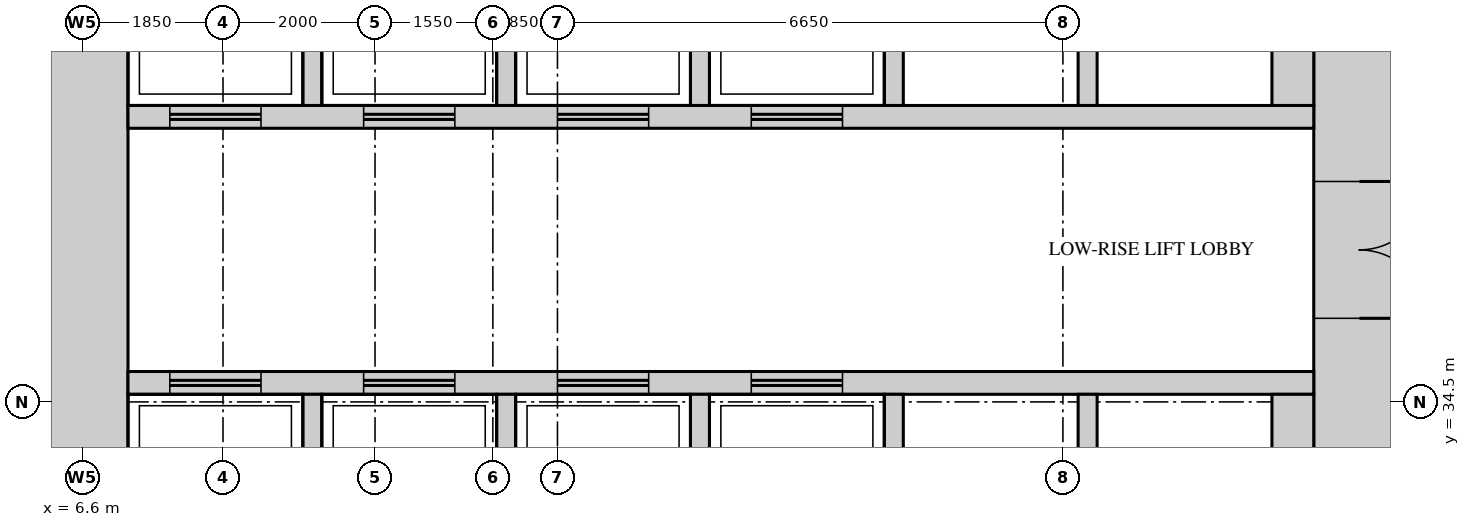
"""IFC4 building model, lengths in metres.
Left out: names, types, materials, properties, quantities, classifications, styles, units other than length and angle.
Written with IfcOpenShell. Run it as: python <this file> out.ifc"""

import sys

from ifc_helpers import new_model, si_unit, direction, frame, frame_2d, origin, place, context, subcontext, project, spatial, rectangle, extrude, source, transform, mapped, element, fill, save


model = new_model("IFC4")
c1 = context("Model", 3, precision=1e-05, world=origin(), true_north=direction((0.0, 1.0)))
c2 = subcontext(c1, "Body", "Model", "MODEL_VIEW")
j1 = project(units=[si_unit("LENGTHUNIT", "METRE"), si_unit("PLANEANGLEUNIT", "RADIAN")], contexts=[c1])
p1 = place(None, origin())
s1 = spatial("IfcSite", under=j1, at=p1, CompositionType="ELEMENT")
p2 = place(p1, origin())
s2 = spatial("IfcBuilding", under=s1, at=p2, CompositionType="ELEMENT")
p3 = place(p2, frame((0.0, 0.0, 82.5)))
s3 = spatial("IfcBuildingStorey", under=s2, at=p3, CompositionType="ELEMENT", Elevation=82.5)
m1 = source(origin(), c2, "Body", "SweptSolid", [
    extrude(rectangle(XDim=27.6, YDim=1.2, at=frame_2d((13.8, 0.0))), origin(), (0.0, 0.0, 1.0), 4.2),
])
p4 = place(p3, frame((23.4, 13.2, 0.0), z_axis=(0.0, 0.0, 1.0), x_axis=(0.0, 1.0, 0.0)))
e1 = element("IfcWall", 1, at=p4, inside=s3, PredefinedType="SHEAR", context=c2, shape_type="MappedRepresentation", body=[
    mapped(m1, transform((0.0, 0.0, 0.0))),
])
m2 = source(origin(), c2, "Body", "SweptSolid", [
    extrude(rectangle(XDim=1.8, YDim=2.1, at=frame_2d((0.9, 1.05))), frame((0.0, 0.61, 0.0), z_axis=(0.0, -1.0, 0.0), x_axis=(1.0, 0.0, 0.0)), (0.0, 0.0, 1.0), 1.22),
])
p5 = place(p4, frame((22.4, 0.0, 0.0)))
e2 = element("IfcOpeningElement", 2, at=p5, cuts=e1, PredefinedType="OPENING", context=c2, shape_type="MappedRepresentation", body=[
    mapped(m2, transform((0.0, 0.0, 0.0))),
])
m3 = source(origin(), c2, "Body", "SweptSolid", [
    extrude(rectangle(XDim=1.2, YDim=2.1, at=frame_2d((0.6, 1.05))), frame((0.0, 0.61, 0.0), z_axis=(0.0, -1.0, 0.0), x_axis=(1.0, 0.0, 0.0)), (0.0, 0.0, 1.0), 1.22),
])
p6 = place(p4, frame((14.4, 0.0, 0.0)))
e3 = element("IfcOpeningElement", 3, at=p6, cuts=e1, PredefinedType="OPENING", context=c2, shape_type="MappedRepresentation", body=[
    mapped(m3, transform((0.0, 0.0, 0.0))),
])
m4 = source(origin(), c2, "Body", "SweptSolid", [
    extrude(rectangle(XDim=0.9, YDim=2.1, at=frame_2d((0.45, 1.05))), frame((0.0, 0.61, 0.0), z_axis=(0.0, -1.0, 0.0), x_axis=(1.0, 0.0, 0.0)), (0.0, 0.0, 1.0), 1.22),
])
p7 = place(p4, frame((1.15, 0.0, 0.0)))
e4 = element("IfcOpeningElement", 4, at=p7, cuts=e1, PredefinedType="OPENING", context=c2, shape_type="MappedRepresentation", body=[
    mapped(m4, transform((0.0, 0.0, 0.0))),
])
p8 = place(p4, frame((6.0, 0.0, 0.0)))
e5 = element("IfcOpeningElement", 5, at=p8, cuts=e1, PredefinedType="OPENING", context=c2, shape_type="MappedRepresentation", body=[
    mapped(m4, transform((0.0, 0.0, 0.0))),
])
p9 = place(p3, frame((6.6, 13.2, 0.0), z_axis=(0.0, 0.0, 1.0), x_axis=(0.0, 1.0, 0.0)))
e6 = element("IfcWall", 6, at=p9, inside=s3, PredefinedType="SHEAR", context=c2, shape_type="MappedRepresentation", body=[
    mapped(m1, transform((0.0, 0.0, 0.0))),
])
m5 = source(origin(), c2, "Body", "SweptSolid", [
    extrude(rectangle(XDim=15.6, YDim=0.3, at=frame_2d((7.8, 0.0))), origin(), (0.0, 0.0, 1.0), 4.2),
])
p10 = place(p3, frame((7.2, 38.25, 0.0), z_axis=(0.0, 0.0, 1.0), x_axis=(1.0, 0.0, 0.0)))
e7 = element("IfcWall", 7, at=p10, inside=s3, PredefinedType="STANDARD", context=c2, shape_type="MappedRepresentation", body=[
    mapped(m5, transform((0.0, 0.0, 0.0))),
])
m6 = source(origin(), c2, "Body", "SweptSolid", [
    extrude(rectangle(XDim=1.2, YDim=2.1, at=frame_2d((0.6, 1.05))), frame((0.0, 0.16, 0.0), z_axis=(0.0, -1.0, 0.0), x_axis=(1.0, 0.0, 0.0)), (0.0, 0.0, 1.0), 0.32),
])
p11 = place(p10, frame((0.55, 0.0, 0.0)))
e8 = element("IfcOpeningElement", 8, at=p11, cuts=e7, PredefinedType="OPENING", context=c2, shape_type="MappedRepresentation", body=[
    mapped(m6, transform((0.0, 0.0, 0.0))),
])
p12 = place(p10, frame((3.1, 0.0, 0.0)))
e9 = element("IfcOpeningElement", 9, at=p12, cuts=e7, PredefinedType="OPENING", context=c2, shape_type="MappedRepresentation", body=[
    mapped(m6, transform((0.0, 0.0, 0.0))),
])
p13 = place(p10, frame((5.65, 0.0, 0.0)))
e10 = element("IfcOpeningElement", 10, at=p13, cuts=e7, PredefinedType="OPENING", context=c2, shape_type="MappedRepresentation", body=[
    mapped(m6, transform((0.0, 0.0, 0.0))),
])
p14 = place(p10, frame((8.2, 0.0, 0.0)))
e11 = element("IfcOpeningElement", 11, at=p14, cuts=e7, PredefinedType="OPENING", context=c2, shape_type="MappedRepresentation", body=[
    mapped(m6, transform((0.0, 0.0, 0.0))),
])
p15 = place(p3, frame((7.2, 34.75, 0.0), z_axis=(0.0, 0.0, 1.0), x_axis=(1.0, 0.0, 0.0)))
e12 = element("IfcWall", 12, at=p15, inside=s3, PredefinedType="STANDARD", context=c2, shape_type="MappedRepresentation", body=[
    mapped(m5, transform((0.0, 0.0, 0.0))),
])
p16 = place(p15, frame((0.55, 0.0, 0.0)))
e13 = element("IfcOpeningElement", 13, at=p16, cuts=e12, PredefinedType="OPENING", context=c2, shape_type="MappedRepresentation", body=[
    mapped(m6, transform((0.0, 0.0, 0.0))),
])
p17 = place(p15, frame((3.1, 0.0, 0.0)))
e14 = element("IfcOpeningElement", 14, at=p17, cuts=e12, PredefinedType="OPENING", context=c2, shape_type="MappedRepresentation", body=[
    mapped(m6, transform((0.0, 0.0, 0.0))),
])
p18 = place(p15, frame((5.65, 0.0, 0.0)))
e15 = element("IfcOpeningElement", 15, at=p18, cuts=e12, PredefinedType="OPENING", context=c2, shape_type="MappedRepresentation", body=[
    mapped(m6, transform((0.0, 0.0, 0.0))),
])
p19 = place(p15, frame((8.2, 0.0, 0.0)))
e16 = element("IfcOpeningElement", 16, at=p19, cuts=e12, PredefinedType="OPENING", context=c2, shape_type="MappedRepresentation", body=[
    mapped(m6, transform((0.0, 0.0, 0.0))),
])
m7 = source(origin(), c2, "Body", "SweptSolid", [
    extrude(rectangle(XDim=2.4, YDim=0.25, at=frame_2d((1.2, 0.0))), origin(), (0.0, 0.0, 1.0), 4.2),
])
for number, where, z_axis, x_axis in (
    (17, (9.625, 38.4, 0.0), (0.0, 0.0, 1.0), (0.0, 1.0, 0.0)),
    (18, (12.175, 38.4, 0.0), (0.0, 0.0, 1.0), (0.0, 1.0, 0.0)),
    (19, (14.725, 38.4, 0.0), (0.0, 0.0, 1.0), (0.0, 1.0, 0.0)),
    (20, (17.275, 38.4, 0.0), (0.0, 0.0, 1.0), (0.0, 1.0, 0.0)),
    (21, (19.825, 38.4, 0.0), (0.0, 0.0, 1.0), (0.0, 1.0, 0.0)),
):
    element("IfcWall", number, at=place(p3, frame(where, z_axis=z_axis, x_axis=x_axis)), inside=s3, PredefinedType="STANDARD", context=c2, shape_type="MappedRepresentation", body=[
        mapped(m7, transform((0.0, 0.0, 0.0))),
    ])
m8 = source(origin(), c2, "Body", "SweptSolid", [
    extrude(rectangle(XDim=2.4, YDim=0.55, at=frame_2d((1.2, 0.0))), origin(), (0.0, 0.0, 1.0), 4.2),
])
p20 = place(p3, frame((22.525, 38.4, 0.0), z_axis=(0.0, 0.0, 1.0), x_axis=(0.0, 1.0, 0.0)))
e22 = element("IfcWall", 22, at=p20, inside=s3, PredefinedType="STANDARD", context=c2, shape_type="MappedRepresentation", body=[
    mapped(m8, transform((0.0, 0.0, 0.0))),
])
for number, where, z_axis, x_axis in (
    (23, (9.625, 32.2, 0.0), (0.0, 0.0, 1.0), (0.0, 1.0, 0.0)),
    (24, (12.175, 32.2, 0.0), (0.0, 0.0, 1.0), (0.0, 1.0, 0.0)),
    (25, (14.725, 32.2, 0.0), (0.0, 0.0, 1.0), (0.0, 1.0, 0.0)),
    (26, (17.275, 32.2, 0.0), (0.0, 0.0, 1.0), (0.0, 1.0, 0.0)),
    (27, (19.825, 32.2, 0.0), (0.0, 0.0, 1.0), (0.0, 1.0, 0.0)),
):
    element("IfcWall", number, at=place(p3, frame(where, z_axis=z_axis, x_axis=x_axis)), inside=s3, PredefinedType="STANDARD", context=c2, shape_type="MappedRepresentation", body=[
        mapped(m7, transform((0.0, 0.0, 0.0))),
    ])
p21 = place(p3, frame((22.525, 32.2, 0.0), z_axis=(0.0, 0.0, 1.0), x_axis=(0.0, 1.0, 0.0)))
e28 = element("IfcWall", 28, at=p21, inside=s3, PredefinedType="STANDARD", context=c2, shape_type="MappedRepresentation", body=[
    mapped(m8, transform((0.0, 0.0, 0.0))),
])
m9 = source(origin(), c2, "Body", "SweptSolid", [
    extrude(rectangle(XDim=1.8, YDim=2.1, at=frame_2d((0.9, 1.05))), frame((0.0, 0.55, 0.0), z_axis=(0.0, -1.0, 0.0), x_axis=(1.0, 0.0, 0.0)), (0.0, 0.0, 1.0), 1.1),
])
p22 = place(p5, origin())
e29 = element("IfcDoor", 29, at=p22, inside=s3, OperationType="DOUBLE_DOOR_SINGLE_SWING", PredefinedType="DOOR", context=c2, shape_type="MappedRepresentation", body=[
    mapped(m9, transform((0.0, 0.0, 0.0))),
])
fill(e2, e29)
m10 = source(origin(), c2, "Body", "SweptSolid", [
    extrude(rectangle(XDim=1.2, YDim=2.1, at=frame_2d((0.6, 1.05))), frame((0.0, 0.025, 0.0), z_axis=(0.0, -1.0, 0.0), x_axis=(1.0, 0.0, 0.0)), (0.0, 0.0, 1.0), 0.05),
])
p23 = place(p16, origin())
e30 = element("IfcDoor", 30, at=p23, inside=s3, OperationType="DOUBLE_DOOR_SLIDING", PredefinedType="DOOR", context=c2, shape_type="MappedRepresentation", body=[
    mapped(m10, transform((0.0, 0.0, 0.0))),
])
fill(e13, e30)
p24 = place(p17, origin())
e31 = element("IfcDoor", 31, at=p24, inside=s3, OperationType="DOUBLE_DOOR_SLIDING", PredefinedType="DOOR", context=c2, shape_type="MappedRepresentation", body=[
    mapped(m10, transform((0.0, 0.0, 0.0))),
])
fill(e14, e31)
p25 = place(p18, origin())
e32 = element("IfcDoor", 32, at=p25, inside=s3, OperationType="DOUBLE_DOOR_SLIDING", PredefinedType="DOOR", context=c2, shape_type="MappedRepresentation", body=[
    mapped(m10, transform((0.0, 0.0, 0.0))),
])
fill(e15, e32)
p26 = place(p19, origin())
e33 = element("IfcDoor", 33, at=p26, inside=s3, OperationType="DOUBLE_DOOR_SLIDING", PredefinedType="DOOR", context=c2, shape_type="MappedRepresentation", body=[
    mapped(m10, transform((0.0, 0.0, 0.0))),
])
fill(e16, e33)
p27 = place(p11, origin())
e34 = element("IfcDoor", 34, at=p27, inside=s3, OperationType="DOUBLE_DOOR_SLIDING", PredefinedType="DOOR", context=c2, shape_type="MappedRepresentation", body=[
    mapped(m10, transform((0.0, 0.0, 0.0))),
])
fill(e8, e34)
p28 = place(p12, origin())
e35 = element("IfcDoor", 35, at=p28, inside=s3, OperationType="DOUBLE_DOOR_SLIDING", PredefinedType="DOOR", context=c2, shape_type="MappedRepresentation", body=[
    mapped(m10, transform((0.0, 0.0, 0.0))),
])
fill(e9, e35)
p29 = place(p13, origin())
e36 = element("IfcDoor", 36, at=p29, inside=s3, OperationType="DOUBLE_DOOR_SLIDING", PredefinedType="DOOR", context=c2, shape_type="MappedRepresentation", body=[
    mapped(m10, transform((0.0, 0.0, 0.0))),
])
fill(e10, e36)
p30 = place(p14, origin())
e37 = element("IfcDoor", 37, at=p30, inside=s3, OperationType="DOUBLE_DOOR_SLIDING", PredefinedType="DOOR", context=c2, shape_type="MappedRepresentation", body=[
    mapped(m10, transform((0.0, 0.0, 0.0))),
])
fill(e11, e37)
save(model, sys.argv[1])
